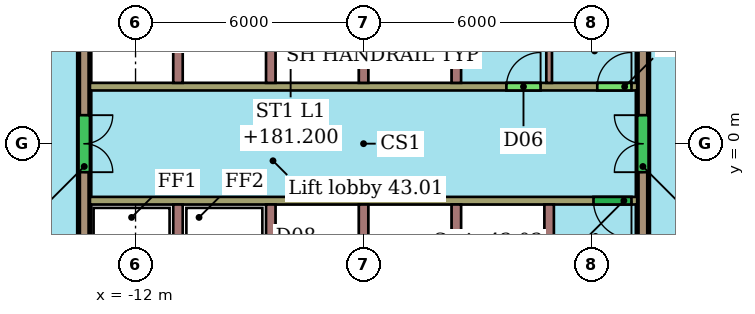
"""IFC4 building model, lengths in metres.
Left out: names, types, materials, properties, quantities, classifications, styles, units other than length and angle.
Written with IfcOpenShell. Run it as: python <this file> out.ifc"""

import sys

from ifc_helpers import new_model, si_unit, direction, frame, frame_2d, origin, place, context, subcontext, project, spatial, rectangle, extrude, element, fill, save


model = new_model("IFC4")
c1 = context("Model", 3, precision=1e-05, world=origin(), true_north=direction((0.0, 1.0)))
c2 = subcontext(c1, "Body", "Model", "MODEL_VIEW")
j1 = project(units=[si_unit("LENGTHUNIT", "METRE"), si_unit("PLANEANGLEUNIT", "RADIAN")], contexts=[c1])
p1 = place(None, origin())
s1 = spatial("IfcSite", under=j1, at=p1, CompositionType="ELEMENT")
p2 = place(p1, origin())
s2 = spatial("IfcBuilding", under=s1, at=p2, CompositionType="ELEMENT")
p3 = place(p2, frame((0.0, 0.0, 179.4)))
s3 = spatial("IfcBuildingStorey", under=s2, at=p3, CompositionType="ELEMENT", Elevation=179.4)
p4 = place(p3, frame((-13.35, 8.0, 0.0), z_axis=(0.0, 0.0, 1.0), x_axis=(0.0, -1.0, 0.0)))
e1 = element("IfcWall", 1, at=p4, inside=s3, PredefinedType="SHEAR", context=c2, shape_type="SweptSolid", body=[
    extrude(rectangle(XDim=16.0, YDim=0.3, at=frame_2d((8.0, 0.0))), origin(), (0.0, 0.0, 1.0), 3.3),
])
p5 = place(p4, frame((2.69, 0.0, 0.0)))
e2 = element("IfcOpeningElement", 2, at=p5, cuts=e1, PredefinedType="OPENING", context=c2, shape_type="SweptSolid", body=[
    extrude(rectangle(XDim=1.2, YDim=2.1, at=frame_2d((0.6, 1.05))), frame((0.0, 0.16, 0.0), z_axis=(0.0, -1.0, 0.0), x_axis=(1.0, 0.0, 0.0)), (0.0, 0.0, 1.0), 0.32),
])
p6 = place(p4, frame((12.99, 0.0, 0.0)))
e3 = element("IfcOpeningElement", 3, at=p6, cuts=e1, PredefinedType="OPENING", context=c2, shape_type="SweptSolid", body=[
    extrude(rectangle(XDim=1.2, YDim=2.1, at=frame_2d((0.6, 1.05))), frame((0.0, 0.16, 0.0), z_axis=(0.0, -1.0, 0.0), x_axis=(1.0, 0.0, 0.0)), (0.0, 0.0, 1.0), 0.32),
])
p7 = place(p4, frame((7.25, 0.0, 0.0)))
e4 = element("IfcOpeningElement", 4, at=p7, cuts=e1, PredefinedType="OPENING", context=c2, shape_type="SweptSolid", body=[
    extrude(rectangle(XDim=1.5, YDim=2.1, at=frame_2d((0.75, 1.05))), frame((0.0, 0.16, 0.0), z_axis=(0.0, -1.0, 0.0), x_axis=(1.0, 0.0, 0.0)), (0.0, 0.0, 1.0), 0.32),
])
p8 = place(p3, frame((1.35, -8.0, 0.0), z_axis=(0.0, 0.0, 1.0), x_axis=(0.0, 1.0, 0.0)))
e5 = element("IfcWall", 5, at=p8, inside=s3, PredefinedType="SHEAR", context=c2, shape_type="SweptSolid", body=[
    extrude(rectangle(XDim=16.0, YDim=0.3, at=frame_2d((8.0, 0.0))), origin(), (0.0, 0.0, 1.0), 3.3),
])
p9 = place(p8, frame((12.11, 0.0, 0.0)))
e6 = element("IfcOpeningElement", 6, at=p9, cuts=e5, PredefinedType="OPENING", context=c2, shape_type="SweptSolid", body=[
    extrude(rectangle(XDim=1.2, YDim=2.1, at=frame_2d((0.6, 1.05))), frame((0.0, 0.16, 0.0), z_axis=(0.0, -1.0, 0.0), x_axis=(1.0, 0.0, 0.0)), (0.0, 0.0, 1.0), 0.32),
])
p10 = place(p8, frame((1.91, 0.0, 0.0)))
e7 = element("IfcOpeningElement", 7, at=p10, cuts=e5, PredefinedType="OPENING", context=c2, shape_type="SweptSolid", body=[
    extrude(rectangle(XDim=1.0, YDim=2.1, at=frame_2d((0.5, 1.05))), frame((0.0, 0.16, 0.0), z_axis=(0.0, -1.0, 0.0), x_axis=(1.0, 0.0, 0.0)), (0.0, 0.0, 1.0), 0.32),
])
p11 = place(p8, frame((7.25, 0.0, 0.0)))
e8 = element("IfcOpeningElement", 8, at=p11, cuts=e5, PredefinedType="OPENING", context=c2, shape_type="SweptSolid", body=[
    extrude(rectangle(XDim=1.5, YDim=2.1, at=frame_2d((0.75, 1.05))), frame((0.0, 0.16, 0.0), z_axis=(0.0, -1.0, 0.0), x_axis=(1.0, 0.0, 0.0)), (0.0, 0.0, 1.0), 0.32),
])
p12 = place(p3, frame((-13.2, 1.5, 0.0), z_axis=(0.0, 0.0, 1.0), x_axis=(1.0, 0.0, 0.0)))
e9 = element("IfcWall", 9, at=p12, inside=s3, PredefinedType="SHEAR", context=c2, shape_type="SweptSolid", body=[
    extrude(rectangle(XDim=14.4, YDim=0.2, at=frame_2d((7.2, 0.0))), origin(), (0.0, 0.0, 1.0), 3.3),
])
p13 = place(p12, frame((10.958, 0.0, 0.0)))
e10 = element("IfcOpeningElement", 10, at=p13, cuts=e9, PredefinedType="OPENING", context=c2, shape_type="SweptSolid", body=[
    extrude(rectangle(XDim=0.9, YDim=2.1, at=frame_2d((0.45, 1.05))), frame((0.0, 0.11, 0.0), z_axis=(0.0, -1.0, 0.0), x_axis=(1.0, 0.0, 0.0)), (0.0, 0.0, 1.0), 0.22),
])
p14 = place(p12, frame((13.35, 0.0, 0.0)))
e11 = element("IfcOpeningElement", 11, at=p14, cuts=e9, PredefinedType="OPENING", context=c2, shape_type="SweptSolid", body=[
    extrude(rectangle(XDim=0.9, YDim=2.1, at=frame_2d((0.45, 1.05))), frame((0.0, 0.11, 0.0), z_axis=(0.0, -1.0, 0.0), x_axis=(1.0, 0.0, 0.0)), (0.0, 0.0, 1.0), 0.22),
])
p15 = place(p3, frame((1.2, -1.5, 0.0), z_axis=(0.0, 0.0, 1.0), x_axis=(-1.0, 0.0, 0.0)))
e12 = element("IfcWall", 12, at=p15, inside=s3, PredefinedType="SHEAR", context=c2, shape_type="SweptSolid", body=[
    extrude(rectangle(XDim=14.4, YDim=0.2, at=frame_2d((7.2, 0.0))), origin(), (0.0, 0.0, 1.0), 3.3),
])
p16 = place(p15, frame((0.15, 0.0, 0.0)))
e13 = element("IfcOpeningElement", 13, at=p16, cuts=e12, PredefinedType="OPENING", context=c2, shape_type="SweptSolid", body=[
    extrude(rectangle(XDim=1.0, YDim=2.1, at=frame_2d((0.5, 1.05))), frame((0.0, 0.11, 0.0), z_axis=(0.0, -1.0, 0.0), x_axis=(1.0, 0.0, 0.0)), (0.0, 0.0, 1.0), 0.22),
])
for number, where, z_axis, x_axis in (
    (14, (-10.883, 1.6, 0.0), (0.0, 0.0, 1.0), (0.0, 1.0, 0.0)),
    (15, (-8.442, 1.6, 0.0), (0.0, 0.0, 1.0), (0.0, 1.0, 0.0)),
    (16, (-6.0, 1.6, 0.0), (0.0, 0.0, 1.0), (0.0, 1.0, 0.0)),
    (17, (-3.558, 1.6, 0.0), (0.0, 0.0, 1.0), (0.0, 1.0, 0.0)),
):
    element("IfcWall", number, at=place(p3, frame(where, z_axis=z_axis, x_axis=x_axis)), inside=s3, PredefinedType="SHEAR", context=c2, shape_type="SweptSolid", body=[
        extrude(rectangle(XDim=1.68, YDim=0.25, at=frame_2d((0.84, 0.0))), origin(), (0.0, 0.0, 1.0), 3.3),
    ])
p17 = place(p3, frame((-1.117, 1.6, 0.0), z_axis=(0.0, 0.0, 1.0), x_axis=(0.0, 1.0, 0.0)))
e18 = element("IfcWall", 18, at=p17, inside=s3, PredefinedType="PARTITIONING", context=c2, shape_type="SweptSolid", body=[
    extrude(rectangle(XDim=1.68, YDim=0.15, at=frame_2d((0.84, 0.0))), origin(), (0.0, 0.0, 1.0), 3.3),
])
for number, where, z_axis, x_axis in (
    (19, (-10.883, -1.6, 0.0), (0.0, 0.0, 1.0), (0.0, -1.0, 0.0)),
    (20, (-8.442, -1.6, 0.0), (0.0, 0.0, 1.0), (0.0, -1.0, 0.0)),
    (21, (-6.0, -1.6, 0.0), (0.0, 0.0, 1.0), (0.0, -1.0, 0.0)),
    (22, (-3.558, -1.6, 0.0), (0.0, 0.0, 1.0), (0.0, -1.0, 0.0)),
    (23, (-1.117, -1.6, 0.0), (0.0, 0.0, 1.0), (0.0, -1.0, 0.0)),
):
    element("IfcWall", number, at=place(p3, frame(where, z_axis=z_axis, x_axis=x_axis)), inside=s3, PredefinedType="SHEAR", context=c2, shape_type="SweptSolid", body=[
        extrude(rectangle(XDim=1.68, YDim=0.25, at=frame_2d((0.84, 0.0))), origin(), (0.0, 0.0, 1.0), 3.3),
    ])
p18 = place(p7, origin())
e24 = element("IfcDoor", 24, at=p18, inside=s3, OperationType="DOUBLE_DOOR_SINGLE_SWING", PredefinedType="NOTDEFINED", context=c2, shape_type="SweptSolid", body=[
    extrude(rectangle(XDim=1.5, YDim=2.1, at=frame_2d((0.75, 1.05))), frame((0.0, 0.025, 0.0), z_axis=(0.0, -1.0, 0.0), x_axis=(1.0, 0.0, 0.0)), (0.0, 0.0, 1.0), 0.05),
])
fill(e4, e24)
p19 = place(p11, origin())
e25 = element("IfcDoor", 25, at=p19, inside=s3, OperationType="DOUBLE_DOOR_SINGLE_SWING", PredefinedType="NOTDEFINED", context=c2, shape_type="SweptSolid", body=[
    extrude(rectangle(XDim=1.5, YDim=2.1, at=frame_2d((0.75, 1.05))), frame((0.0, 0.025, 0.0), z_axis=(0.0, -1.0, 0.0), x_axis=(1.0, 0.0, 0.0)), (0.0, 0.0, 1.0), 0.05),
])
fill(e8, e25)
p20 = place(p13, origin())
e26 = element("IfcDoor", 26, at=p20, inside=s3, OperationType="SINGLE_SWING_RIGHT", PredefinedType="NOTDEFINED", context=c2, shape_type="SweptSolid", body=[
    extrude(rectangle(XDim=0.9, YDim=2.1, at=frame_2d((0.45, 1.05))), frame((0.0, 0.025, 0.0), z_axis=(0.0, -1.0, 0.0), x_axis=(1.0, 0.0, 0.0)), (0.0, 0.0, 1.0), 0.05),
])
fill(e10, e26)
p21 = place(p14, origin())
e27 = element("IfcDoor", 27, at=p21, inside=s3, OperationType="SINGLE_SWING_RIGHT", PredefinedType="NOTDEFINED", context=c2, shape_type="SweptSolid", body=[
    extrude(rectangle(XDim=0.9, YDim=2.1, at=frame_2d((0.45, 1.05))), frame((0.0, 0.025, 0.0), z_axis=(0.0, -1.0, 0.0), x_axis=(1.0, 0.0, 0.0)), (0.0, 0.0, 1.0), 0.05),
])
fill(e11, e27)
p22 = place(p16, origin())
e28 = element("IfcDoor", 28, at=p22, inside=s3, OperationType="SINGLE_SWING_LEFT", PredefinedType="NOTDEFINED", context=c2, shape_type="SweptSolid", body=[
    extrude(rectangle(XDim=1.0, YDim=2.1, at=frame_2d((0.5, 1.05))), frame((0.0, 0.025, 0.0), z_axis=(0.0, -1.0, 0.0), x_axis=(1.0, 0.0, 0.0)), (0.0, 0.0, 1.0), 0.05),
])
fill(e13, e28)
save(model, sys.argv[1])
